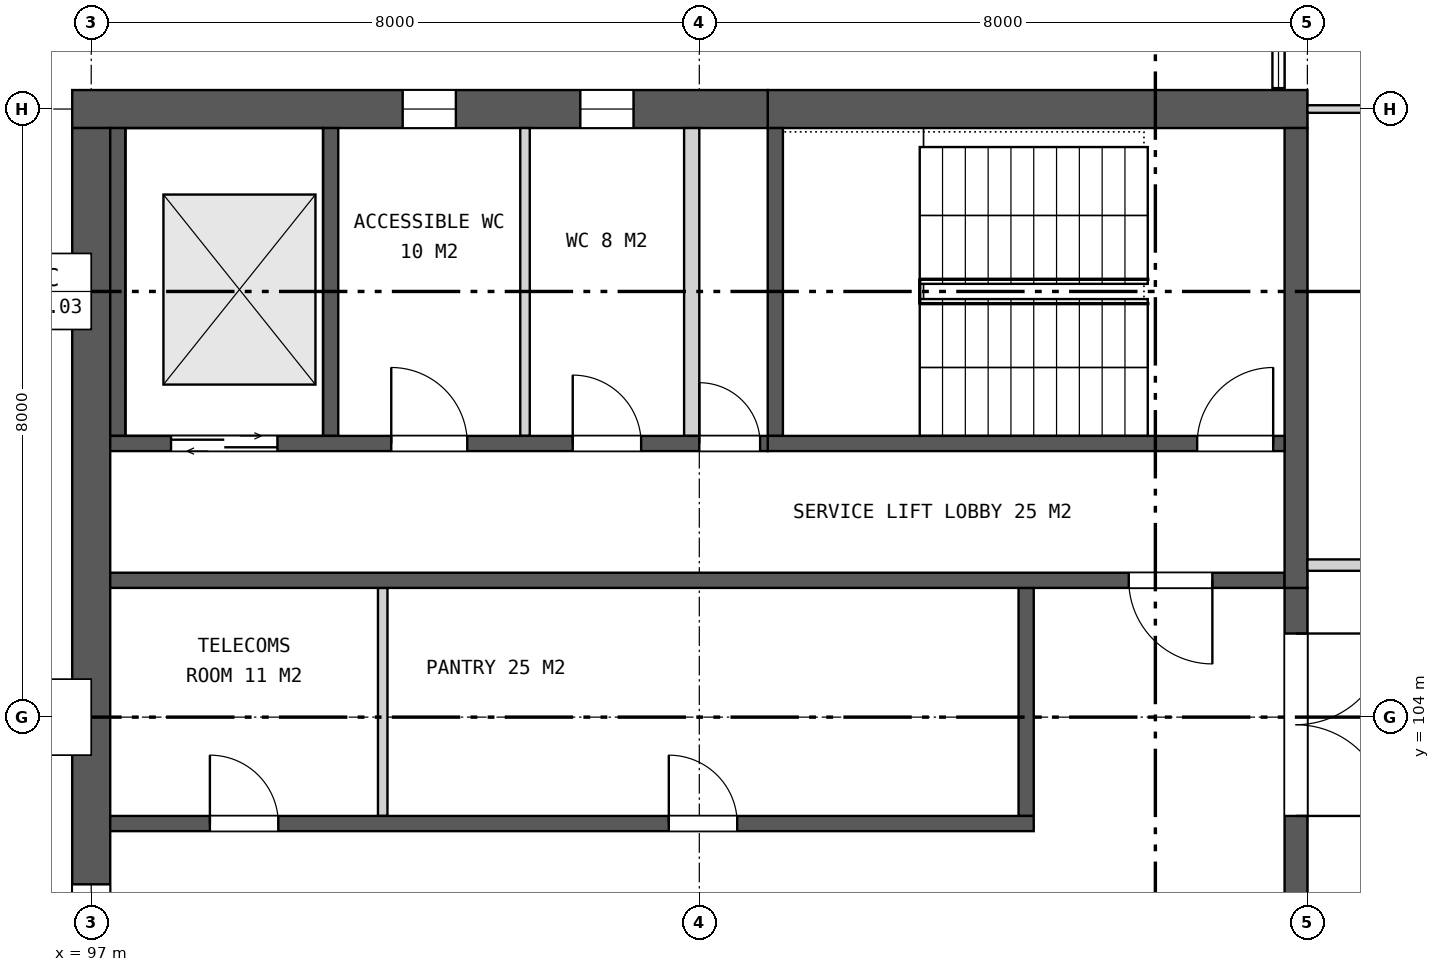
"""IFC4 building model, lengths in metres.
Left out: names, types, materials, properties, quantities, classifications, styles, units other than length and angle.
Written with IfcOpenShell. Run it as: python <this file> out.ifc"""

import sys

from ifc_helpers import new_model, si_unit, direction, frame, frame_2d, origin, place, context, subcontext, project, spatial, rectangle, extrude, element, fill, save


model = new_model("IFC4")
c1 = context("Model", 3, precision=1e-05, world=origin(), true_north=direction((0.0, 1.0)))
c2 = subcontext(c1, "Body", "Model", "MODEL_VIEW")
j1 = project(units=[si_unit("LENGTHUNIT", "METRE"), si_unit("PLANEANGLEUNIT", "RADIAN")], contexts=[c1])
p1 = place(None, origin())
s1 = spatial("IfcSite", under=j1, at=p1, CompositionType="ELEMENT")
p2 = place(p1, origin())
s2 = spatial("IfcBuilding", under=s1, at=p2, CompositionType="ELEMENT")
p3 = place(p2, frame((0.0, 0.0, 299.7)))
s3 = spatial("IfcBuildingStorey", under=s2, at=p3, CompositionType="ELEMENT", Elevation=299.7)
p4 = place(p3, frame((113.0, 112.0, 0.0), z_axis=(0.0, 0.0, 1.0), x_axis=(-1.0, 0.0, 0.0)))
e1 = element("IfcWall", 1, at=p4, inside=s3, PredefinedType="SHEAR", context=c2, shape_type="SweptSolid", body=[
    extrude(rectangle(XDim=7.1, YDim=0.5, at=frame_2d((3.55, 0.0))), origin(), (0.0, 0.0, 1.0), 4.2),
])
p5 = place(p3, frame((105.9, 112.0, 0.0), z_axis=(0.0, 0.0, 1.0), x_axis=(-1.0, 0.0, 0.0)))
e2 = element("IfcWall", 2, at=p5, inside=s3, PredefinedType="SHEAR", context=c2, shape_type="SweptSolid", body=[
    extrude(rectangle(XDim=9.15, YDim=0.5, at=frame_2d((4.575, 0.0))), origin(), (0.0, 0.0, 1.0), 4.2),
])
p6 = place(p5, frame((1.765, 0.0, 1.5)))
e3 = element("IfcOpeningElement", 3, at=p6, cuts=e2, PredefinedType="OPENING", context=c2, shape_type="SweptSolid", body=[
    extrude(rectangle(XDim=0.7, YDim=0.9, at=frame_2d((0.35, 0.45))), frame((0.0, 0.26, 0.0), z_axis=(0.0, -1.0, 0.0), x_axis=(1.0, 0.0, 0.0)), (0.0, 0.0, 1.0), 0.52),
])
p7 = place(p5, frame((4.103, 0.0, 1.5)))
e4 = element("IfcOpeningElement", 4, at=p7, cuts=e2, PredefinedType="OPENING", context=c2, shape_type="SweptSolid", body=[
    extrude(rectangle(XDim=0.7, YDim=0.9, at=frame_2d((0.35, 0.45))), frame((0.0, 0.26, 0.0), z_axis=(0.0, -1.0, 0.0), x_axis=(1.0, 0.0, 0.0)), (0.0, 0.0, 1.0), 0.52),
])
p8 = place(p3, frame((97.0, 111.75, 0.0), z_axis=(0.0, 0.0, 1.0), x_axis=(0.0, -1.0, 0.0)))
e5 = element("IfcWall", 5, at=p8, inside=s3, PredefinedType="SHEAR", context=c2, shape_type="SweptSolid", body=[
    extrude(rectangle(XDim=23.5, YDim=0.5, at=frame_2d((11.75, 0.0))), origin(), (0.0, 0.0, 1.0), 4.2),
])
p9 = place(p8, frame((9.95, 0.0, 0.15)))
e6 = element("IfcOpeningElement", 6, at=p9, cuts=e5, PredefinedType="OPENING", context=c2, shape_type="SweptSolid", body=[
    extrude(rectangle(XDim=3.6, YDim=3.0, at=frame_2d((1.8, 1.5))), frame((0.0, 0.26, 0.0), z_axis=(0.0, -1.0, 0.0), x_axis=(1.0, 0.0, 0.0)), (0.0, 0.0, 1.0), 0.52),
])
p10 = place(p3, frame((112.85, 105.7, 0.0), z_axis=(0.0, 0.0, 1.0), x_axis=(0.0, -1.0, 0.0)))
e7 = element("IfcWall", 7, at=p10, inside=s3, PredefinedType="SHEAR", context=c2, shape_type="SweptSolid", body=[
    extrude(rectangle(XDim=11.4, YDim=0.3, at=frame_2d((5.7, 0.0))), origin(), (0.0, 0.0, 1.0), 4.2),
])
p11 = place(p10, frame((0.6, 0.0, 0.0)))
e8 = element("IfcOpeningElement", 8, at=p11, cuts=e7, PredefinedType="OPENING", context=c2, shape_type="SweptSolid", body=[
    extrude(rectangle(XDim=2.4, YDim=2.4, at=frame_2d((1.2, 1.2))), frame((0.0, 0.16, 0.0), z_axis=(0.0, -1.0, 0.0), x_axis=(1.0, 0.0, 0.0)), (0.0, 0.0, 1.0), 0.32),
])
p12 = place(p10, frame((4.5, 0.0, 0.0)))
e9 = element("IfcOpeningElement", 9, at=p12, cuts=e7, PredefinedType="OPENING", context=c2, shape_type="SweptSolid", body=[
    extrude(rectangle(XDim=2.4, YDim=2.4, at=frame_2d((1.2, 1.2))), frame((0.0, 0.16, 0.0), z_axis=(0.0, -1.0, 0.0), x_axis=(1.0, 0.0, 0.0)), (0.0, 0.0, 1.0), 0.32),
])
p13 = place(p10, frame((8.4, 0.0, 0.0)))
e10 = element("IfcOpeningElement", 10, at=p13, cuts=e7, PredefinedType="OPENING", context=c2, shape_type="SweptSolid", body=[
    extrude(rectangle(XDim=2.4, YDim=2.4, at=frame_2d((1.2, 1.2))), frame((0.0, 0.16, 0.0), z_axis=(0.0, -1.0, 0.0), x_axis=(1.0, 0.0, 0.0)), (0.0, 0.0, 1.0), 0.32),
])
p14 = place(p3, frame((109.3, 105.7, 0.0), z_axis=(0.0, 0.0, 1.0), x_axis=(0.0, -1.0, 0.0)))
e11 = element("IfcWall", 11, at=p14, inside=s3, PredefinedType="SHEAR", context=c2, shape_type="SweptSolid", body=[
    extrude(rectangle(XDim=3.0, YDim=0.2, at=frame_2d((1.5, 0.0))), origin(), (0.0, 0.0, 1.0), 4.2),
])
p15 = place(p3, frame((100.835, 105.7, 0.0), z_axis=(0.0, 0.0, 1.0), x_axis=(0.0, -1.0, 0.0)))
e12 = element("IfcWall", 12, at=p15, inside=s3, PredefinedType="PARTITIONING", context=c2, shape_type="SweptSolid", body=[
    extrude(rectangle(XDim=3.0, YDim=0.125, at=frame_2d((1.5, 0.0))), origin(), (0.0, 0.0, 1.0), 4.2),
])
p16 = place(p3, frame((109.4, 102.6, 0.0), z_axis=(0.0, 0.0, 1.0), x_axis=(-1.0, 0.0, 0.0)))
e13 = element("IfcWall", 13, at=p16, inside=s3, PredefinedType="SHEAR", context=c2, shape_type="SweptSolid", body=[
    extrude(rectangle(XDim=12.15, YDim=0.2, at=frame_2d((6.075, 0.0))), origin(), (0.0, 0.0, 1.0), 4.2),
])
p17 = place(p16, frame((3.901, 0.0, 0.0)))
e14 = element("IfcOpeningElement", 14, at=p17, cuts=e13, PredefinedType="OPENING", context=c2, shape_type="SweptSolid", body=[
    extrude(rectangle(XDim=0.9, YDim=2.1, at=frame_2d((0.45, 1.05))), frame((0.0, 0.11, 0.0), z_axis=(0.0, -1.0, 0.0), x_axis=(1.0, 0.0, 0.0)), (0.0, 0.0, 1.0), 0.22),
])
p18 = place(p16, frame((9.939, 0.0, 0.0)))
e15 = element("IfcOpeningElement", 15, at=p18, cuts=e13, PredefinedType="OPENING", context=c2, shape_type="SweptSolid", body=[
    extrude(rectangle(XDim=0.9, YDim=2.1, at=frame_2d((0.45, 1.05))), frame((0.0, 0.11, 0.0), z_axis=(0.0, -1.0, 0.0), x_axis=(1.0, 0.0, 0.0)), (0.0, 0.0, 1.0), 0.22),
])
p19 = place(p3, frame((112.7, 105.8, 0.0), z_axis=(0.0, 0.0, 1.0), x_axis=(-1.0, 0.0, 0.0)))
e16 = element("IfcWall", 16, at=p19, inside=s3, PredefinedType="SHEAR", context=c2, shape_type="SweptSolid", body=[
    extrude(rectangle(XDim=15.45, YDim=0.2, at=frame_2d((7.725, 0.0))), origin(), (0.0, 0.0, 1.0), 4.2),
])
p20 = place(p19, frame((0.95, 0.0, 0.0)))
e17 = element("IfcOpeningElement", 17, at=p20, cuts=e16, PredefinedType="OPENING", context=c2, shape_type="SweptSolid", body=[
    extrude(rectangle(XDim=1.1, YDim=2.1, at=frame_2d((0.55, 1.05))), frame((0.0, 0.11, 0.0), z_axis=(0.0, -1.0, 0.0), x_axis=(1.0, 0.0, 0.0)), (0.0, 0.0, 1.0), 0.22),
])
p21 = place(p3, frame((112.85, 111.75, 0.0), z_axis=(0.0, 0.0, 1.0), x_axis=(0.0, -1.0, 0.0)))
e18 = element("IfcWall", 18, at=p21, inside=s3, PredefinedType="SHEAR", context=c2, shape_type="SweptSolid", body=[
    extrude(rectangle(XDim=6.05, YDim=0.3, at=frame_2d((3.025, 0.0))), origin(), (0.0, 0.0, 1.0), 4.2),
])
for number, where, z_axis, x_axis in (
    (19, (106.0, 111.75, 0.0), (0.0, 0.0, 1.0), (0.0, -1.0, 0.0)),
    (20, (100.15, 111.75, 0.0), (0.0, 0.0, 1.0), (0.0, -1.0, 0.0)),
    (21, (97.35, 111.75, 0.0), (0.0, 0.0, 1.0), (0.0, -1.0, 0.0)),
):
    element("IfcWall", number, at=place(p3, frame(where, z_axis=z_axis, x_axis=x_axis)), inside=s3, PredefinedType="SHEAR", context=c2, shape_type="SweptSolid", body=[
        extrude(rectangle(XDim=4.05, YDim=0.2, at=frame_2d((2.025, 0.0))), origin(), (0.0, 0.0, 1.0), 4.2),
    ])
p22 = place(p3, frame((104.9, 111.75, 0.0), z_axis=(0.0, 0.0, 1.0), x_axis=(0.0, -1.0, 0.0)))
e22 = element("IfcWall", 22, at=p22, inside=s3, PredefinedType="PARTITIONING", context=c2, shape_type="SweptSolid", body=[
    extrude(rectangle(XDim=4.05, YDim=0.2, at=frame_2d((2.025, 0.0))), origin(), (0.0, 0.0, 1.0), 4.2),
])
p23 = place(p3, frame((102.707, 111.75, 0.0), z_axis=(0.0, 0.0, 1.0), x_axis=(0.0, -1.0, 0.0)))
e23 = element("IfcWall", 23, at=p23, inside=s3, PredefinedType="PARTITIONING", context=c2, shape_type="SweptSolid", body=[
    extrude(rectangle(XDim=4.05, YDim=0.125, at=frame_2d((2.025, 0.0))), origin(), (0.0, 0.0, 1.0), 4.2),
])
p24 = place(p3, frame((112.7, 107.6, 0.0), z_axis=(0.0, 0.0, 1.0), x_axis=(-1.0, 0.0, 0.0)))
e24 = element("IfcWall", 24, at=p24, inside=s3, PredefinedType="SHEAR", context=c2, shape_type="SweptSolid", body=[
    extrude(rectangle(XDim=6.8, YDim=0.2, at=frame_2d((3.4, 0.0))), origin(), (0.0, 0.0, 1.0), 4.2),
])
p25 = place(p24, frame((0.15, 0.0, 0.0)))
e25 = element("IfcOpeningElement", 25, at=p25, cuts=e24, PredefinedType="OPENING", context=c2, shape_type="SweptSolid", body=[
    extrude(rectangle(XDim=1.0, YDim=2.1, at=frame_2d((0.5, 1.05))), frame((0.0, 0.11, 0.0), z_axis=(0.0, -1.0, 0.0), x_axis=(1.0, 0.0, 0.0)), (0.0, 0.0, 1.0), 0.22),
])
p26 = place(p3, frame((105.9, 107.6, 0.0), z_axis=(0.0, 0.0, 1.0), x_axis=(-1.0, 0.0, 0.0)))
e26 = element("IfcWall", 26, at=p26, inside=s3, PredefinedType="SHEAR", context=c2, shape_type="SweptSolid", body=[
    extrude(rectangle(XDim=8.65, YDim=0.2, at=frame_2d((4.325, 0.0))), origin(), (0.0, 0.0, 1.0), 4.2),
])
p27 = place(p26, frame((0.1, 0.0, 0.0)))
e27 = element("IfcOpeningElement", 27, at=p27, cuts=e26, PredefinedType="OPENING", context=c2, shape_type="SweptSolid", body=[
    extrude(rectangle(XDim=0.8, YDim=2.1, at=frame_2d((0.4, 1.05))), frame((0.0, 0.11, 0.0), z_axis=(0.0, -1.0, 0.0), x_axis=(1.0, 0.0, 0.0)), (0.0, 0.0, 1.0), 0.22),
])
p28 = place(p26, frame((1.665, 0.0, 0.0)))
e28 = element("IfcOpeningElement", 28, at=p28, cuts=e26, PredefinedType="OPENING", context=c2, shape_type="SweptSolid", body=[
    extrude(rectangle(XDim=0.9, YDim=2.1, at=frame_2d((0.45, 1.05))), frame((0.0, 0.11, 0.0), z_axis=(0.0, -1.0, 0.0), x_axis=(1.0, 0.0, 0.0)), (0.0, 0.0, 1.0), 0.22),
])
p29 = place(p26, frame((3.953, 0.0, 0.0)))
e29 = element("IfcOpeningElement", 29, at=p29, cuts=e26, PredefinedType="OPENING", context=c2, shape_type="SweptSolid", body=[
    extrude(rectangle(XDim=1.0, YDim=2.1, at=frame_2d((0.5, 1.05))), frame((0.0, 0.11, 0.0), z_axis=(0.0, -1.0, 0.0), x_axis=(1.0, 0.0, 0.0)), (0.0, 0.0, 1.0), 0.22),
])
p30 = place(p26, frame((6.45, 0.0, 0.0)))
e30 = element("IfcOpeningElement", 30, at=p30, cuts=e26, PredefinedType="OPENING", context=c2, shape_type="SweptSolid", body=[
    extrude(rectangle(XDim=1.4, YDim=2.1, at=frame_2d((0.7, 1.05))), frame((0.0, 0.11, 0.0), z_axis=(0.0, -1.0, 0.0), x_axis=(1.0, 0.0, 0.0)), (0.0, 0.0, 1.0), 0.22),
])
p31 = place(p3, frame((113.0, 106.0, 0.0), z_axis=(0.0, 0.0, 1.0), x_axis=(1.0, 0.0, 0.0)))
e31 = element("IfcWall", 31, at=p31, inside=s3, PredefinedType="PARTITIONING", context=c2, shape_type="SweptSolid", body=[
    extrude(rectangle(XDim=5.525, YDim=0.15, at=frame_2d((2.762, 0.0))), origin(), (0.0, 0.0, 1.0), 3.255),
])
p32 = place(p3, frame((113.0, 112.0, 0.0), z_axis=(0.0, 0.0, 1.0), x_axis=(1.0, 0.0, 0.0)))
e32 = element("IfcWall", 32, at=p32, inside=s3, PredefinedType="PARTITIONING", context=c2, shape_type="SweptSolid", body=[
    extrude(rectangle(XDim=5.525, YDim=0.1, at=frame_2d((2.762, 0.0))), origin(), (0.0, 0.0, 1.0), 3.255),
])
p33 = place(p6, origin())
e33 = element("IfcWindow", 33, at=p33, inside=s3, PartitioningType="SINGLE_PANEL", PredefinedType="WINDOW", context=c2, shape_type="SweptSolid", body=[
    extrude(rectangle(XDim=0.7, YDim=0.9, at=frame_2d((0.35, 0.45))), frame((0.0, 0.03, 0.0), z_axis=(0.0, -1.0, 0.0), x_axis=(1.0, 0.0, 0.0)), (0.0, 0.0, 1.0), 0.06),
])
fill(e3, e33)
p34 = place(p7, origin())
e34 = element("IfcWindow", 34, at=p34, inside=s3, PartitioningType="SINGLE_PANEL", PredefinedType="WINDOW", context=c2, shape_type="SweptSolid", body=[
    extrude(rectangle(XDim=0.7, YDim=0.9, at=frame_2d((0.35, 0.45))), frame((0.0, 0.03, 0.0), z_axis=(0.0, -1.0, 0.0), x_axis=(1.0, 0.0, 0.0)), (0.0, 0.0, 1.0), 0.06),
])
fill(e4, e34)
p35 = place(p9, origin())
e35 = element("IfcWindow", 35, at=p35, inside=s3, PartitioningType="SINGLE_PANEL", PredefinedType="WINDOW", context=c2, shape_type="SweptSolid", body=[
    extrude(rectangle(XDim=3.6, YDim=3.0, at=frame_2d((1.8, 1.5))), frame((0.0, 0.03, 0.0), z_axis=(0.0, -1.0, 0.0), x_axis=(1.0, 0.0, 0.0)), (0.0, 0.0, 1.0), 0.06),
])
fill(e6, e35)
p36 = place(p11, origin())
e36 = element("IfcDoor", 36, at=p36, inside=s3, OperationType="DOUBLE_DOOR_SINGLE_SWING", PredefinedType="DOOR", context=c2, shape_type="SweptSolid", body=[
    extrude(rectangle(XDim=2.4, YDim=2.4, at=frame_2d((1.2, 1.2))), frame((0.0, 0.025, 0.0), z_axis=(0.0, -1.0, 0.0), x_axis=(1.0, 0.0, 0.0)), (0.0, 0.0, 1.0), 0.05),
])
fill(e8, e36)
p37 = place(p17, frame((0.9, 0.0, 0.0), z_axis=(0.0, 0.0, 1.0), x_axis=(-1.0, 0.0, 0.0)))
e37 = element("IfcDoor", 37, at=p37, inside=s3, OperationType="SINGLE_SWING_LEFT", PredefinedType="DOOR", context=c2, shape_type="SweptSolid", body=[
    extrude(rectangle(XDim=0.9, YDim=2.1, at=frame_2d((0.45, 1.05))), frame((0.0, 0.025, 0.0), z_axis=(0.0, -1.0, 0.0), x_axis=(1.0, 0.0, 0.0)), (0.0, 0.0, 1.0), 0.05),
])
fill(e14, e37)
p38 = place(p18, frame((0.9, 0.0, 0.0), z_axis=(0.0, 0.0, 1.0), x_axis=(-1.0, 0.0, 0.0)))
e38 = element("IfcDoor", 38, at=p38, inside=s3, OperationType="SINGLE_SWING_LEFT", PredefinedType="DOOR", context=c2, shape_type="SweptSolid", body=[
    extrude(rectangle(XDim=0.9, YDim=2.1, at=frame_2d((0.45, 1.05))), frame((0.0, 0.025, 0.0), z_axis=(0.0, -1.0, 0.0), x_axis=(1.0, 0.0, 0.0)), (0.0, 0.0, 1.0), 0.05),
])
fill(e15, e38)
p39 = place(p20, origin())
e39 = element("IfcDoor", 39, at=p39, inside=s3, OperationType="SINGLE_SWING_LEFT", PredefinedType="DOOR", context=c2, shape_type="SweptSolid", body=[
    extrude(rectangle(XDim=1.1, YDim=2.1, at=frame_2d((0.55, 1.05))), frame((0.0, 0.025, 0.0), z_axis=(0.0, -1.0, 0.0), x_axis=(1.0, 0.0, 0.0)), (0.0, 0.0, 1.0), 0.05),
])
fill(e17, e39)
p40 = place(p25, frame((1.0, 0.0, 0.0), z_axis=(0.0, 0.0, 1.0), x_axis=(-1.0, 0.0, 0.0)))
e40 = element("IfcDoor", 40, at=p40, inside=s3, OperationType="SINGLE_SWING_RIGHT", PredefinedType="DOOR", context=c2, shape_type="SweptSolid", body=[
    extrude(rectangle(XDim=1.0, YDim=2.1, at=frame_2d((0.5, 1.05))), frame((0.0, 0.025, 0.0), z_axis=(0.0, -1.0, 0.0), x_axis=(1.0, 0.0, 0.0)), (0.0, 0.0, 1.0), 0.05),
])
fill(e25, e40)
p41 = place(p27, frame((0.8, 0.0, 0.0), z_axis=(0.0, 0.0, 1.0), x_axis=(-1.0, 0.0, 0.0)))
e41 = element("IfcDoor", 41, at=p41, inside=s3, OperationType="SINGLE_SWING_LEFT", PredefinedType="DOOR", context=c2, shape_type="SweptSolid", body=[
    extrude(rectangle(XDim=0.8, YDim=2.1, at=frame_2d((0.4, 1.05))), frame((0.0, 0.025, 0.0), z_axis=(0.0, -1.0, 0.0), x_axis=(1.0, 0.0, 0.0)), (0.0, 0.0, 1.0), 0.05),
])
fill(e27, e41)
p42 = place(p28, frame((0.9, 0.0, 0.0), z_axis=(0.0, 0.0, 1.0), x_axis=(-1.0, 0.0, 0.0)))
e42 = element("IfcDoor", 42, at=p42, inside=s3, OperationType="SINGLE_SWING_LEFT", PredefinedType="DOOR", context=c2, shape_type="SweptSolid", body=[
    extrude(rectangle(XDim=0.9, YDim=2.1, at=frame_2d((0.45, 1.05))), frame((0.0, 0.025, 0.0), z_axis=(0.0, -1.0, 0.0), x_axis=(1.0, 0.0, 0.0)), (0.0, 0.0, 1.0), 0.05),
])
fill(e28, e42)
p43 = place(p29, frame((1.0, 0.0, 0.0), z_axis=(0.0, 0.0, 1.0), x_axis=(-1.0, 0.0, 0.0)))
e43 = element("IfcDoor", 43, at=p43, inside=s3, OperationType="SINGLE_SWING_LEFT", PredefinedType="DOOR", context=c2, shape_type="SweptSolid", body=[
    extrude(rectangle(XDim=1.0, YDim=2.1, at=frame_2d((0.5, 1.05))), frame((0.0, 0.025, 0.0), z_axis=(0.0, -1.0, 0.0), x_axis=(1.0, 0.0, 0.0)), (0.0, 0.0, 1.0), 0.05),
])
fill(e29, e43)
p44 = place(p30, origin())
e44 = element("IfcDoor", 44, at=p44, inside=s3, OperationType="DOUBLE_DOOR_SLIDING", PredefinedType="DOOR", context=c2, shape_type="SweptSolid", body=[
    extrude(rectangle(XDim=1.4, YDim=2.1, at=frame_2d((0.7, 1.05))), frame((0.0, 0.025, 0.0), z_axis=(0.0, -1.0, 0.0), x_axis=(1.0, 0.0, 0.0)), (0.0, 0.0, 1.0), 0.05),
])
fill(e30, e44)
save(model, sys.argv[1])
